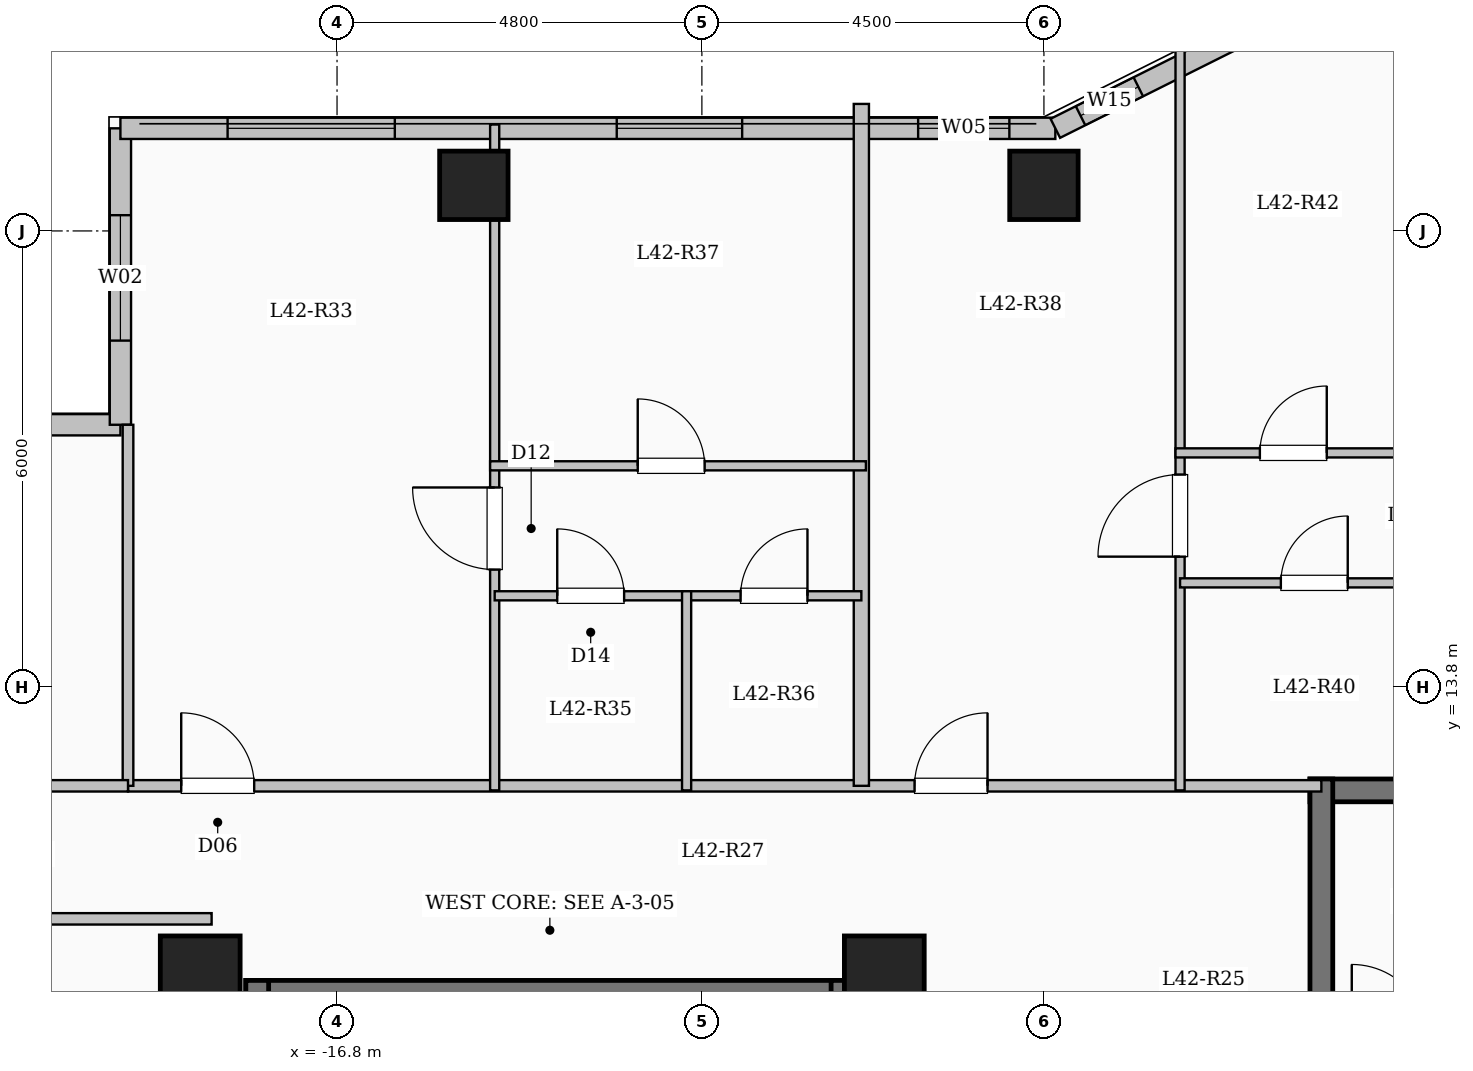
"""IFC4 building model, lengths in metres.
Left out: names, types, materials, properties, quantities, classifications, styles, units other than length and angle.
Written with IfcOpenShell. Run it as: python <this file> out.ifc"""

import sys

from ifc_helpers import new_model, si_unit, direction, frame, frame_2d, origin, origin_2d, place, context, subcontext, project, spatial, rectangle, extrude, element, fill, save


model = new_model("IFC4")
c1 = context("Model", 3, precision=1e-05, world=origin(), true_north=direction((0.0, 1.0)))
c2 = subcontext(c1, "Body", "Model", "MODEL_VIEW")
j1 = project(units=[si_unit("LENGTHUNIT", "METRE"), si_unit("PLANEANGLEUNIT", "RADIAN")], contexts=[c1])
p1 = place(None, origin())
s1 = spatial("IfcSite", under=j1, at=p1, CompositionType="ELEMENT")
p2 = place(p1, origin())
s2 = spatial("IfcBuilding", under=s1, at=p2, CompositionType="ELEMENT")
p3 = place(p2, frame((0.0, 0.0, 156.05)))
s3 = spatial("IfcBuildingStorey", under=s2, at=p3, CompositionType="ELEMENT", Elevation=156.05)
for number, where, z_axis, x_axis in (
    (1, (-9.6, 10.0, 0.0), (0.0, 0.0, 1.0), (1.0, 0.0, 0.0)),
    (2, (-18.6, 10.0, 0.0), (0.0, 0.0, 1.0), (1.0, 0.0, 0.0)),
):
    element("IfcColumn", number, at=place(p3, frame(where, z_axis=z_axis, x_axis=x_axis)), inside=s3, PredefinedType="COLUMN", context=c2, shape_type="SweptSolid", body=[
        extrude(rectangle(XDim=1.05, YDim=1.05, at=origin_2d()), origin(), (0.0, 0.0, 1.0), 3.35),
    ])
for number, where, z_axis, x_axis in (
    (3, (-15.0, 20.4, 0.0), (0.0, 0.0, 1.0), (1.0, 0.0, 0.0)),
    (4, (-7.5, 20.4, 0.0), (0.0, 0.0, 1.0), (1.0, 0.0, 0.0)),
):
    element("IfcColumn", number, at=place(p3, frame(where, z_axis=z_axis, x_axis=x_axis)), inside=s3, PredefinedType="COLUMN", context=c2, shape_type="SweptSolid", body=[
        extrude(rectangle(XDim=0.9, YDim=0.9, at=origin_2d()), origin(), (0.0, 0.0, 1.0), 3.35),
    ])
p4 = place(p3, frame((-25.05, 17.25, 0.0), z_axis=(0.0, 0.0, 1.0), x_axis=(1.0, 0.0, 0.0)))
e5 = element("IfcWall", 5, at=p4, inside=s3, PredefinedType="SOLIDWALL", context=c2, shape_type="SweptSolid", body=[
    extrude(rectangle(XDim=5.4, YDim=0.28, at=frame_2d((2.7, 0.0))), origin(), (0.0, 0.0, 1.0), 3.1),
])
p5 = place(p4, frame((1.725, 0.0, 0.9)))
e6 = element("IfcOpeningElement", 6, at=p5, cuts=e5, PredefinedType="OPENING", context=c2, shape_type="SweptSolid", body=[
    extrude(rectangle(XDim=2.0, YDim=1.7, at=frame_2d((1.0, 0.85))), frame((0.0, 0.15, 0.0), z_axis=(0.0, -1.0, 0.0), x_axis=(1.0, 0.0, 0.0)), (0.0, 0.0, 1.0), 0.3),
])
p6 = place(p3, frame((-19.65, 17.25, 0.0), z_axis=(0.0, 0.0, 1.0), x_axis=(0.0, 1.0, 0.0)))
e7 = element("IfcWall", 7, at=p6, inside=s3, PredefinedType="SOLIDWALL", context=c2, shape_type="SweptSolid", body=[
    extrude(rectangle(XDim=3.9, YDim=0.28, at=frame_2d((1.95, 0.0))), origin(), (0.0, 0.0, 1.0), 3.1),
])
p7 = place(p6, frame((1.107, 0.0, 0.9)))
e8 = element("IfcOpeningElement", 8, at=p7, cuts=e7, PredefinedType="OPENING", context=c2, shape_type="SweptSolid", body=[
    extrude(rectangle(XDim=1.65, YDim=1.6, at=frame_2d((0.825, 0.8))), frame((0.0, 0.15, 0.0), z_axis=(0.0, -1.0, 0.0), x_axis=(1.0, 0.0, 0.0)), (0.0, 0.0, 1.0), 0.3),
])
p8 = place(p3, frame((-19.65, 21.15, 0.0), z_axis=(0.0, 0.0, 1.0), x_axis=(1.0, 0.0, 0.0)))
e9 = element("IfcWall", 9, at=p8, inside=s3, PredefinedType="SOLIDWALL", context=c2, shape_type="SweptSolid", body=[
    extrude(rectangle(XDim=12.3, YDim=0.28, at=frame_2d((6.15, 0.0))), origin(), (0.0, 0.0, 1.0), 3.1),
])
p9 = place(p8, frame((1.41, 0.0, 0.9)))
e10 = element("IfcOpeningElement", 10, at=p9, cuts=e9, PredefinedType="OPENING", context=c2, shape_type="SweptSolid", body=[
    extrude(rectangle(XDim=2.2, YDim=1.75, at=frame_2d((1.1, 0.875))), frame((0.0, 0.15, 0.0), z_axis=(0.0, -1.0, 0.0), x_axis=(1.0, 0.0, 0.0)), (0.0, 0.0, 1.0), 0.3),
])
p10 = place(p8, frame((6.53, 0.0, 0.9)))
e11 = element("IfcOpeningElement", 11, at=p10, cuts=e9, PredefinedType="OPENING", context=c2, shape_type="SweptSolid", body=[
    extrude(rectangle(XDim=1.65, YDim=1.6, at=frame_2d((0.825, 0.8))), frame((0.0, 0.15, 0.0), z_axis=(0.0, -1.0, 0.0), x_axis=(1.0, 0.0, 0.0)), (0.0, 0.0, 1.0), 0.3),
])
p11 = place(p8, frame((10.495, 0.0, 0.95)))
e12 = element("IfcOpeningElement", 12, at=p11, cuts=e9, PredefinedType="OPENING", context=c2, shape_type="SweptSolid", body=[
    extrude(rectangle(XDim=1.2, YDim=1.5, at=frame_2d((0.6, 0.75))), frame((0.0, 0.15, 0.0), z_axis=(0.0, -1.0, 0.0), x_axis=(1.0, 0.0, 0.0)), (0.0, 0.0, 1.0), 0.3),
])
p12 = place(p3, frame((-7.35, 21.15, 0.0), z_axis=(0.0, 0.0, 1.0), x_axis=(0.894427191, 0.4472135955, 0.0)))
e13 = element("IfcWall", 13, at=p12, inside=s3, PredefinedType="SOLIDWALL", context=c2, shape_type="SweptSolid", body=[
    extrude(rectangle(XDim=3.354, YDim=0.28, at=frame_2d((1.677, 0.0))), origin(), (0.0, 0.0, 1.0), 3.1),
])
p13 = place(p12, frame((0.371, 0.0, 0.95)))
e14 = element("IfcOpeningElement", 14, at=p13, cuts=e13, PredefinedType="OPENING", context=c2, shape_type="SweptSolid", body=[
    extrude(rectangle(XDim=0.85, YDim=1.5, at=frame_2d((0.425, 0.75))), frame((0.0, 0.15, 0.0), z_axis=(0.0, -1.0, 0.0), x_axis=(1.0, 0.0, 0.0)), (0.0, 0.0, 1.0), 0.3),
])
p14 = place(p3, frame((-18.0, 9.79, 0.0), z_axis=(0.0, 0.0, 1.0), x_axis=(1.0, 0.0, 0.0)))
e15 = element("IfcWall", 15, at=p14, inside=s3, PredefinedType="SHEAR", context=c2, shape_type="SweptSolid", body=[
    extrude(rectangle(XDim=8.0, YDim=0.3, at=frame_2d((4.0, 0.0))), origin(), (0.0, 0.0, 1.0), 3.35),
])
for number, where, z_axis, x_axis in (
    (16, (-17.85, 6.35, 0.0), (0.0, 0.0, 1.0), (0.0, 1.0, 0.0)),
    (17, (-10.15, 6.35, 0.0), (0.0, 0.0, 1.0), (0.0, 1.0, 0.0)),
):
    element("IfcWall", number, at=place(p3, frame(where, z_axis=z_axis, x_axis=x_axis)), inside=s3, PredefinedType="SHEAR", context=c2, shape_type="SweptSolid", body=[
        extrude(rectangle(XDim=3.59, YDim=0.3, at=frame_2d((1.795, 0.0))), origin(), (0.0, 0.0, 1.0), 3.35),
    ])
p15 = place(p3, frame((-4.0, 12.44, 0.0), z_axis=(0.0, 0.0, 1.0), x_axis=(1.0, 0.0, 0.0)))
e18 = element("IfcWall", 18, at=p15, inside=s3, PredefinedType="SHEAR", context=c2, shape_type="SweptSolid", body=[
    extrude(rectangle(XDim=8.0, YDim=0.3, at=frame_2d((4.0, 0.0))), origin(), (0.0, 0.0, 1.0), 3.35),
])
p16 = place(p3, frame((-3.85, 9.0, 0.0), z_axis=(0.0, 0.0, 1.0), x_axis=(0.0, 1.0, 0.0)))
e19 = element("IfcWall", 19, at=p16, inside=s3, PredefinedType="SHEAR", context=c2, shape_type="SweptSolid", body=[
    extrude(rectangle(XDim=3.59, YDim=0.3, at=frame_2d((1.795, 0.0))), origin(), (0.0, 0.0, 1.0), 3.35),
])
p17 = place(p3, frame((-19.55, 12.5, 0.0), z_axis=(0.0, 0.0, 1.0), x_axis=(1.0, 0.0, 0.0)))
e20 = element("IfcWall", 20, at=p17, inside=s3, PredefinedType="PARTITIONING", context=c2, shape_type="SweptSolid", body=[
    extrude(rectangle(XDim=15.7, YDim=0.15, at=frame_2d((7.85, 0.0))), origin(), (0.0, 0.0, 1.0), 3.1),
])
p18 = place(p17, frame((0.7, 0.0, 0.0)))
e21 = element("IfcOpeningElement", 21, at=p18, cuts=e20, PredefinedType="OPENING", context=c2, shape_type="SweptSolid", body=[
    extrude(rectangle(XDim=0.96, YDim=2.15, at=frame_2d((0.48, 1.075))), frame((0.0, 0.085, 0.0), z_axis=(0.0, -1.0, 0.0), x_axis=(1.0, 0.0, 0.0)), (0.0, 0.0, 1.0), 0.17),
])
p19 = place(p17, frame((10.348, 0.0, 0.0)))
e22 = element("IfcOpeningElement", 22, at=p19, cuts=e20, PredefinedType="OPENING", context=c2, shape_type="SweptSolid", body=[
    extrude(rectangle(XDim=0.96, YDim=2.15, at=frame_2d((0.48, 1.075))), frame((0.0, 0.085, 0.0), z_axis=(0.0, -1.0, 0.0), x_axis=(1.0, 0.0, 0.0)), (0.0, 0.0, 1.0), 0.17),
])
p20 = place(p3, frame((-9.902, 12.5, 0.0), z_axis=(0.0, 0.0, 1.0), x_axis=(0.0, 1.0, 0.0)))
e23 = element("IfcWall", 23, at=p20, inside=s3, PredefinedType="SOLIDWALL", context=c2, shape_type="SweptSolid", body=[
    extrude(rectangle(XDim=8.971, YDim=0.2, at=frame_2d((4.485, 0.0))), origin(), (0.0, 0.0, 1.0), 3.1),
])
p21 = place(p3, frame((-14.726, 12.44, 0.0), z_axis=(0.0, 0.0, 1.0), x_axis=(0.0, 1.0, 0.0)))
e24 = element("IfcWall", 24, at=p21, inside=s3, PredefinedType="PARTITIONING", context=c2, shape_type="SweptSolid", body=[
    extrude(rectangle(XDim=8.76, YDim=0.12, at=frame_2d((4.38, 0.0))), origin(), (0.0, 0.0, 1.0), 2.585),
])
p22 = place(p21, frame((2.905, 0.0, 0.0)))
e25 = element("IfcOpeningElement", 25, at=p22, cuts=e24, PredefinedType="OPENING", context=c2, shape_type="SweptSolid", body=[
    extrude(rectangle(XDim=1.08, YDim=2.15, at=frame_2d((0.54, 1.075))), frame((0.0, 0.07, 0.0), z_axis=(0.0, -1.0, 0.0), x_axis=(1.0, 0.0, 0.0)), (0.0, 0.0, 1.0), 0.14),
])
p23 = place(p3, frame((-14.726, 15.0, 0.0), z_axis=(0.0, 0.0, 1.0), x_axis=(1.0, 0.0, 0.0)))
e26 = element("IfcWall", 26, at=p23, inside=s3, PredefinedType="PARTITIONING", context=c2, shape_type="SweptSolid", body=[
    extrude(rectangle(XDim=2.525, YDim=0.12, at=frame_2d((1.263, 0.0))), origin(), (0.0, 0.0, 1.0), 3.1),
])
p24 = place(p23, frame((0.823, 0.0, 0.0)))
e27 = element("IfcOpeningElement", 27, at=p24, cuts=e26, PredefinedType="OPENING", context=c2, shape_type="SweptSolid", body=[
    extrude(rectangle(XDim=0.88, YDim=2.1, at=frame_2d((0.44, 1.05))), frame((0.0, 0.07, 0.0), z_axis=(0.0, -1.0, 0.0), x_axis=(1.0, 0.0, 0.0)), (0.0, 0.0, 1.0), 0.14),
])
p25 = place(p3, frame((-12.201, 15.0, 0.0), z_axis=(0.0, 0.0, 1.0), x_axis=(1.0, 0.0, 0.0)))
e28 = element("IfcWall", 28, at=p25, inside=s3, PredefinedType="PARTITIONING", context=c2, shape_type="SweptSolid", body=[
    extrude(rectangle(XDim=2.299, YDim=0.12, at=frame_2d((1.149, 0.0))), origin(), (0.0, 0.0, 1.0), 3.1),
])
p26 = place(p25, frame((0.71, 0.0, 0.0)))
e29 = element("IfcOpeningElement", 29, at=p26, cuts=e28, PredefinedType="OPENING", context=c2, shape_type="SweptSolid", body=[
    extrude(rectangle(XDim=0.88, YDim=2.1, at=frame_2d((0.44, 1.05))), frame((0.0, 0.07, 0.0), z_axis=(0.0, -1.0, 0.0), x_axis=(1.0, 0.0, 0.0)), (0.0, 0.0, 1.0), 0.14),
])
p27 = place(p3, frame((-14.786, 16.71, 0.0), z_axis=(0.0, 0.0, 1.0), x_axis=(1.0, 0.0, 0.0)))
e30 = element("IfcWall", 30, at=p27, inside=s3, PredefinedType="PARTITIONING", context=c2, shape_type="SweptSolid", body=[
    extrude(rectangle(XDim=4.944, YDim=0.12, at=frame_2d((2.472, 0.0))), origin(), (0.0, 0.0, 1.0), 3.1),
])
p28 = place(p27, frame((1.942, 0.0, 0.0)))
e31 = element("IfcOpeningElement", 31, at=p28, cuts=e30, PredefinedType="OPENING", context=c2, shape_type="SweptSolid", body=[
    extrude(rectangle(XDim=0.88, YDim=2.1, at=frame_2d((0.44, 1.05))), frame((0.0, 0.07, 0.0), z_axis=(0.0, -1.0, 0.0), x_axis=(1.0, 0.0, 0.0)), (0.0, 0.0, 1.0), 0.14),
])
p29 = place(p3, frame((-12.201, 12.44, 0.0), z_axis=(0.0, 0.0, 1.0), x_axis=(0.0, 1.0, 0.0)))
e32 = element("IfcWall", 32, at=p29, inside=s3, PredefinedType="PARTITIONING", context=c2, shape_type="SweptSolid", body=[
    extrude(rectangle(XDim=2.62, YDim=0.12, at=frame_2d((1.31, 0.0))), origin(), (0.0, 0.0, 1.0), 3.1),
])
p30 = place(p3, frame((-5.709, 12.44, 0.0), z_axis=(0.0, 0.0, 1.0), x_axis=(0.0, 1.0, 0.0)))
e33 = element("IfcWall", 33, at=p30, inside=s3, PredefinedType="PARTITIONING", context=c2, shape_type="SweptSolid", body=[
    extrude(rectangle(XDim=10.065, YDim=0.12, at=frame_2d((5.032, 0.0))), origin(), (0.0, 0.0, 1.0), 3.1),
])
p31 = place(p30, frame((3.075, 0.0, 0.0)))
e34 = element("IfcOpeningElement", 34, at=p31, cuts=e33, PredefinedType="OPENING", context=c2, shape_type="SweptSolid", body=[
    extrude(rectangle(XDim=1.08, YDim=2.15, at=frame_2d((0.54, 1.075))), frame((0.0, 0.07, 0.0), z_axis=(0.0, -1.0, 0.0), x_axis=(1.0, 0.0, 0.0)), (0.0, 0.0, 1.0), 0.14),
])
p32 = place(p3, frame((-5.709, 15.17, 0.0), z_axis=(0.0, 0.0, 1.0), x_axis=(1.0, 0.0, 0.0)))
e35 = element("IfcWall", 35, at=p32, inside=s3, PredefinedType="PARTITIONING", context=c2, shape_type="SweptSolid", body=[
    extrude(rectangle(XDim=3.533, YDim=0.12, at=frame_2d((1.767, 0.0))), origin(), (0.0, 0.0, 1.0), 3.1),
])
p33 = place(p32, frame((1.326, 0.0, 0.0)))
e36 = element("IfcOpeningElement", 36, at=p33, cuts=e35, PredefinedType="OPENING", context=c2, shape_type="SweptSolid", body=[
    extrude(rectangle(XDim=0.88, YDim=2.1, at=frame_2d((0.44, 1.05))), frame((0.0, 0.07, 0.0), z_axis=(0.0, -1.0, 0.0), x_axis=(1.0, 0.0, 0.0)), (0.0, 0.0, 1.0), 0.14),
])
p34 = place(p3, frame((-5.769, 16.88, 0.0), z_axis=(0.0, 0.0, 1.0), x_axis=(1.0, 0.0, 0.0)))
e37 = element("IfcWall", 37, at=p34, inside=s3, PredefinedType="PARTITIONING", context=c2, shape_type="SweptSolid", body=[
    extrude(rectangle(XDim=6.379, YDim=0.12, at=frame_2d((3.189, 0.0))), origin(), (0.0, 0.0, 1.0), 2.685),
])
p35 = place(p34, frame((1.11, 0.0, 0.0)))
e38 = element("IfcOpeningElement", 38, at=p35, cuts=e37, PredefinedType="OPENING", context=c2, shape_type="SweptSolid", body=[
    extrude(rectangle(XDim=0.88, YDim=2.1, at=frame_2d((0.44, 1.05))), frame((0.0, 0.07, 0.0), z_axis=(0.0, -1.0, 0.0), x_axis=(1.0, 0.0, 0.0)), (0.0, 0.0, 1.0), 0.14),
])
p36 = place(p34, frame((4.209, 0.0, 0.0)))
e39 = element("IfcOpeningElement", 39, at=p36, cuts=e37, PredefinedType="OPENING", context=c2, shape_type="SweptSolid", body=[
    extrude(rectangle(XDim=0.88, YDim=2.1, at=frame_2d((0.44, 1.05))), frame((0.0, 0.07, 0.0), z_axis=(0.0, -1.0, 0.0), x_axis=(1.0, 0.0, 0.0)), (0.0, 0.0, 1.0), 0.14),
])
p37 = place(p3, frame((-25.08, 10.75, 0.0), z_axis=(0.0, 0.0, 1.0), x_axis=(1.0, 0.0, 0.0)))
e40 = element("IfcWall", 40, at=p37, inside=s3, PredefinedType="PARTITIONING", context=c2, shape_type="SweptSolid", body=[
    extrude(rectangle(XDim=6.63, YDim=0.15, at=frame_2d((3.315, 0.0))), origin(), (0.0, 0.0, 1.0), 3.1),
])
p38 = place(p3, frame((-19.55, 12.5, 0.0), z_axis=(0.0, 0.0, 1.0), x_axis=(0.0, 1.0, 0.0)))
e41 = element("IfcWall", 41, at=p38, inside=s3, PredefinedType="PARTITIONING", context=c2, shape_type="SweptSolid", body=[
    extrude(rectangle(XDim=4.75, YDim=0.14, at=frame_2d((2.375, 0.0))), origin(), (0.0, 0.0, 1.0), 3.1),
])
p39 = place(p3, frame((-25.08, 12.5, 0.0), z_axis=(0.0, 0.0, 1.0), x_axis=(1.0, 0.0, 0.0)))
e42 = element("IfcWall", 42, at=p39, inside=s3, PredefinedType="PARTITIONING", context=c2, shape_type="SweptSolid", body=[
    extrude(rectangle(XDim=5.53, YDim=0.15, at=frame_2d((2.765, 0.0))), origin(), (0.0, 0.0, 1.0), 3.1),
])
p40 = place(p39, frame((2.29, 0.0, 0.0)))
e43 = element("IfcOpeningElement", 43, at=p40, cuts=e42, PredefinedType="OPENING", context=c2, shape_type="SweptSolid", body=[
    extrude(rectangle(XDim=0.95, YDim=2.15, at=frame_2d((0.475, 1.075))), frame((0.0, 0.085, 0.0), z_axis=(0.0, -1.0, 0.0), x_axis=(1.0, 0.0, 0.0)), (0.0, 0.0, 1.0), 0.17),
])
p41 = place(p7, origin())
e44 = element("IfcWindow", 44, at=p41, inside=s3, PartitioningType="SINGLE_PANEL", PredefinedType="WINDOW", context=c2, shape_type="SweptSolid", body=[
    extrude(rectangle(XDim=1.65, YDim=1.6, at=frame_2d((0.825, 0.8))), frame((0.0, 0.03, 0.0), z_axis=(0.0, -1.0, 0.0), x_axis=(1.0, 0.0, 0.0)), (0.0, 0.0, 1.0), 0.06),
])
fill(e8, e44)
p42 = place(p9, origin())
e45 = element("IfcWindow", 45, at=p42, inside=s3, PartitioningType="SINGLE_PANEL", PredefinedType="WINDOW", context=c2, shape_type="SweptSolid", body=[
    extrude(rectangle(XDim=2.2, YDim=1.75, at=frame_2d((1.1, 0.875))), frame((0.0, 0.03, 0.0), z_axis=(0.0, -1.0, 0.0), x_axis=(1.0, 0.0, 0.0)), (0.0, 0.0, 1.0), 0.06),
])
fill(e10, e45)
p43 = place(p10, origin())
e46 = element("IfcWindow", 46, at=p43, inside=s3, PartitioningType="SINGLE_PANEL", PredefinedType="WINDOW", context=c2, shape_type="SweptSolid", body=[
    extrude(rectangle(XDim=1.65, YDim=1.6, at=frame_2d((0.825, 0.8))), frame((0.0, 0.03, 0.0), z_axis=(0.0, -1.0, 0.0), x_axis=(1.0, 0.0, 0.0)), (0.0, 0.0, 1.0), 0.06),
])
fill(e11, e46)
p44 = place(p11, origin())
e47 = element("IfcWindow", 47, at=p44, inside=s3, PartitioningType="SINGLE_PANEL", PredefinedType="WINDOW", context=c2, shape_type="SweptSolid", body=[
    extrude(rectangle(XDim=1.2, YDim=1.5, at=frame_2d((0.6, 0.75))), frame((0.0, 0.03, 0.0), z_axis=(0.0, -1.0, 0.0), x_axis=(1.0, 0.0, 0.0)), (0.0, 0.0, 1.0), 0.06),
])
fill(e12, e47)
p45 = place(p13, origin())
e48 = element("IfcWindow", 48, at=p45, inside=s3, PartitioningType="SINGLE_PANEL", PredefinedType="WINDOW", context=c2, shape_type="SweptSolid", body=[
    extrude(rectangle(XDim=0.85, YDim=1.5, at=frame_2d((0.425, 0.75))), frame((0.0, 0.03, 0.0), z_axis=(0.0, -1.0, 0.0), x_axis=(1.0, 0.0, 0.0)), (0.0, 0.0, 1.0), 0.06),
])
fill(e14, e48)
p46 = place(p18, origin())
e49 = element("IfcDoor", 49, at=p46, inside=s3, OperationType="SINGLE_SWING_LEFT", PredefinedType="DOOR", context=c2, shape_type="SweptSolid", body=[
    extrude(rectangle(XDim=0.96, YDim=2.15, at=frame_2d((0.48, 1.075))), frame((0.0, 0.025, 0.0), z_axis=(0.0, -1.0, 0.0), x_axis=(1.0, 0.0, 0.0)), (0.0, 0.0, 1.0), 0.05),
])
fill(e21, e49)
p47 = place(p22, origin())
e50 = element("IfcDoor", 50, at=p47, inside=s3, OperationType="SINGLE_SWING_RIGHT", PredefinedType="DOOR", context=c2, shape_type="SweptSolid", body=[
    extrude(rectangle(XDim=1.08, YDim=2.15, at=frame_2d((0.54, 1.075))), frame((0.0, 0.025, 0.0), z_axis=(0.0, -1.0, 0.0), x_axis=(1.0, 0.0, 0.0)), (0.0, 0.0, 1.0), 0.05),
])
fill(e25, e50)
p48 = place(p24, origin())
e51 = element("IfcDoor", 51, at=p48, inside=s3, OperationType="SINGLE_SWING_LEFT", PredefinedType="DOOR", context=c2, shape_type="SweptSolid", body=[
    extrude(rectangle(XDim=0.88, YDim=2.1, at=frame_2d((0.44, 1.05))), frame((0.0, 0.025, 0.0), z_axis=(0.0, -1.0, 0.0), x_axis=(1.0, 0.0, 0.0)), (0.0, 0.0, 1.0), 0.05),
])
fill(e27, e51)
p49 = place(p26, origin())
e52 = element("IfcDoor", 52, at=p49, inside=s3, OperationType="SINGLE_SWING_RIGHT", PredefinedType="DOOR", context=c2, shape_type="SweptSolid", body=[
    extrude(rectangle(XDim=0.88, YDim=2.1, at=frame_2d((0.44, 1.05))), frame((0.0, 0.025, 0.0), z_axis=(0.0, -1.0, 0.0), x_axis=(1.0, 0.0, 0.0)), (0.0, 0.0, 1.0), 0.05),
])
fill(e29, e52)
p50 = place(p28, origin())
e53 = element("IfcDoor", 53, at=p50, inside=s3, OperationType="SINGLE_SWING_LEFT", PredefinedType="DOOR", context=c2, shape_type="SweptSolid", body=[
    extrude(rectangle(XDim=0.88, YDim=2.1, at=frame_2d((0.44, 1.05))), frame((0.0, 0.025, 0.0), z_axis=(0.0, -1.0, 0.0), x_axis=(1.0, 0.0, 0.0)), (0.0, 0.0, 1.0), 0.05),
])
fill(e31, e53)
p51 = place(p19, origin())
e54 = element("IfcDoor", 54, at=p51, inside=s3, OperationType="SINGLE_SWING_RIGHT", PredefinedType="DOOR", context=c2, shape_type="SweptSolid", body=[
    extrude(rectangle(XDim=0.96, YDim=2.15, at=frame_2d((0.48, 1.075))), frame((0.0, 0.025, 0.0), z_axis=(0.0, -1.0, 0.0), x_axis=(1.0, 0.0, 0.0)), (0.0, 0.0, 1.0), 0.05),
])
fill(e22, e54)
p52 = place(p31, origin())
e55 = element("IfcDoor", 55, at=p52, inside=s3, OperationType="SINGLE_SWING_LEFT", PredefinedType="DOOR", context=c2, shape_type="SweptSolid", body=[
    extrude(rectangle(XDim=1.08, YDim=2.15, at=frame_2d((0.54, 1.075))), frame((0.0, 0.025, 0.0), z_axis=(0.0, -1.0, 0.0), x_axis=(1.0, 0.0, 0.0)), (0.0, 0.0, 1.0), 0.05),
])
fill(e34, e55)
p53 = place(p33, origin())
e56 = element("IfcDoor", 56, at=p53, inside=s3, OperationType="SINGLE_SWING_RIGHT", PredefinedType="DOOR", context=c2, shape_type="SweptSolid", body=[
    extrude(rectangle(XDim=0.88, YDim=2.1, at=frame_2d((0.44, 1.05))), frame((0.0, 0.025, 0.0), z_axis=(0.0, -1.0, 0.0), x_axis=(1.0, 0.0, 0.0)), (0.0, 0.0, 1.0), 0.05),
])
fill(e36, e56)
p54 = place(p35, origin())
e57 = element("IfcDoor", 57, at=p54, inside=s3, OperationType="SINGLE_SWING_RIGHT", PredefinedType="DOOR", context=c2, shape_type="SweptSolid", body=[
    extrude(rectangle(XDim=0.88, YDim=2.1, at=frame_2d((0.44, 1.05))), frame((0.0, 0.025, 0.0), z_axis=(0.0, -1.0, 0.0), x_axis=(1.0, 0.0, 0.0)), (0.0, 0.0, 1.0), 0.05),
])
fill(e38, e57)
save(model, sys.argv[1])
